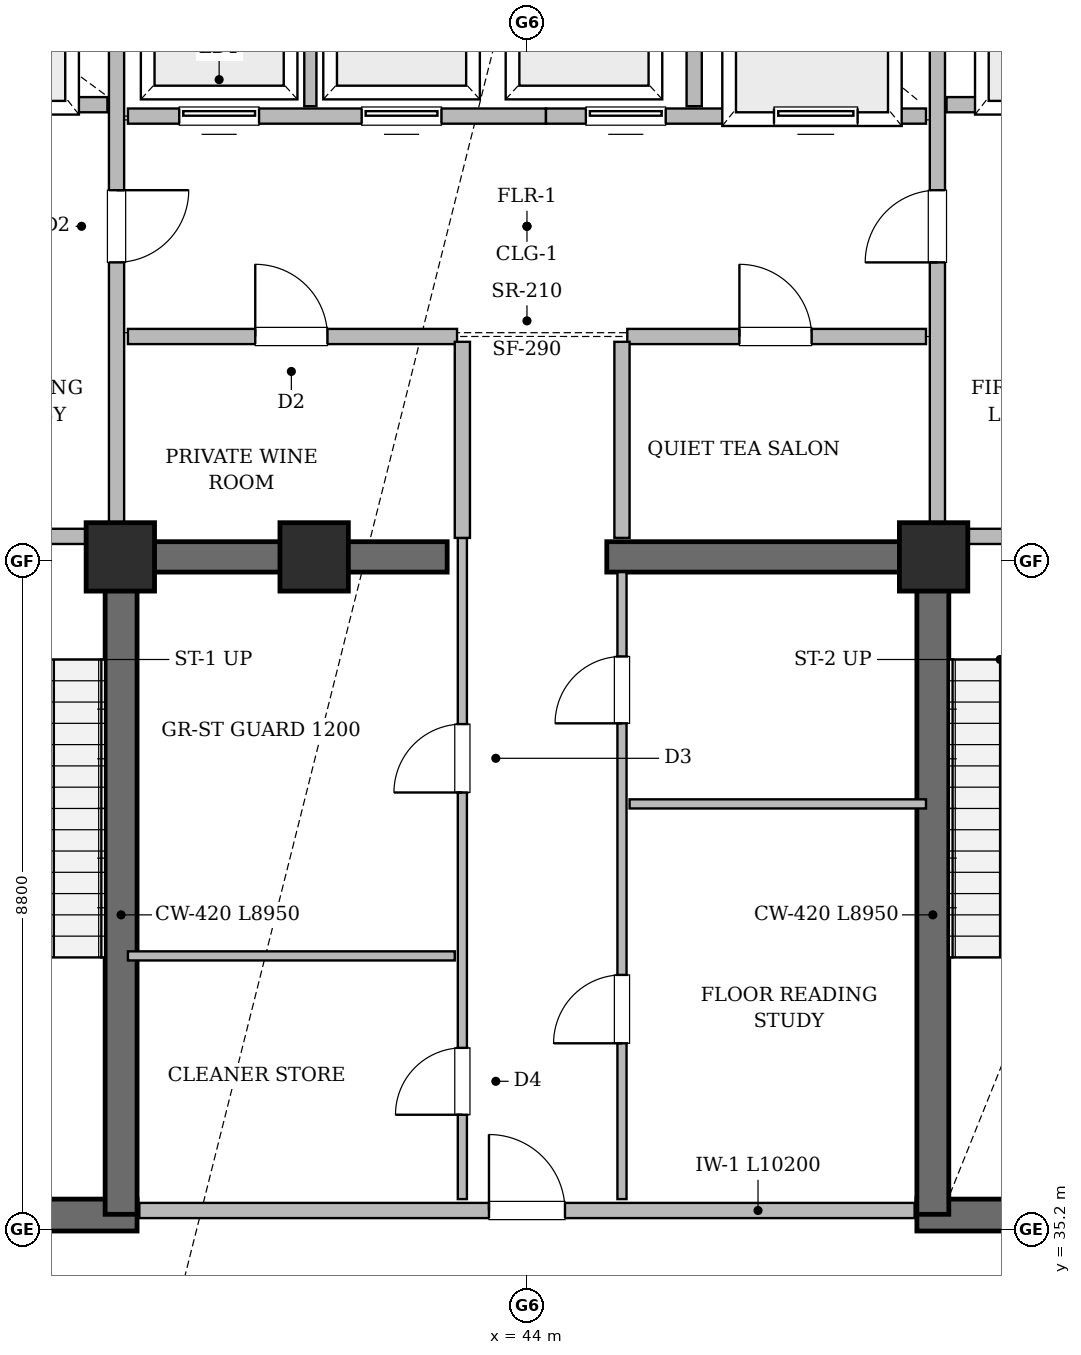
"""IFC4 building model, lengths in metres.
Left out: names, types, materials, properties, quantities, classifications, styles, units other than length and angle.
Written with IfcOpenShell. Run it as: python <this file> out.ifc"""

import sys

from ifc_helpers import new_model, si_unit, direction, frame, frame_2d, origin, origin_2d, place, context, subcontext, project, spatial, rectangle, extrude, element, fill, save


model = new_model("IFC4")
c1 = context("Model", 3, precision=1e-05, world=origin(), true_north=direction((0.0, 1.0)))
c2 = subcontext(c1, "Body", "Model", "MODEL_VIEW")
j1 = project(units=[si_unit("LENGTHUNIT", "METRE"), si_unit("PLANEANGLEUNIT", "RADIAN")], contexts=[c1])
p1 = place(None, origin())
s1 = spatial("IfcSite", under=j1, at=p1, CompositionType="ELEMENT")
p2 = place(p1, origin())
s2 = spatial("IfcBuilding", under=s1, at=p2, CompositionType="ELEMENT")
p3 = place(p2, frame((0.0, 0.0, 295.4)))
s3 = spatial("IfcBuildingStorey", under=s2, at=p3, CompositionType="ELEMENT", Elevation=295.4)
for number, where, z_axis, x_axis in (
    (1, (35.18, 35.39, 0.0), (0.0, 0.0, 1.0), (1.0, 0.0, 0.0)),
    (2, (49.13, 35.39, 0.0), (0.0, 0.0, 1.0), (1.0, 0.0, 0.0)),
):
    element("IfcWall", number, at=place(p3, frame(where, z_axis=z_axis, x_axis=x_axis)), inside=s3, PredefinedType="SHEAR", context=c2, shape_type="SweptSolid", body=[
        extrude(rectangle(XDim=3.69, YDim=0.42, at=frame_2d((1.845, 0.0))), origin(), (0.0, 0.0, 1.0), 5.14),
    ])
for number, where, z_axis, x_axis in (
    (3, (38.66, 35.4, 0.0), (0.0, 0.0, 1.0), (0.0, 1.0, 0.0)),
    (4, (49.34, 35.4, 0.0), (0.0, 0.0, 1.0), (0.0, 1.0, 0.0)),
):
    element("IfcWall", number, at=place(p3, frame(where, z_axis=z_axis, x_axis=x_axis)), inside=s3, PredefinedType="SHEAR", context=c2, shape_type="SweptSolid", body=[
        extrude(rectangle(XDim=8.95, YDim=0.42, at=frame_2d((4.475, 0.0))), origin(), (0.0, 0.0, 1.0), 5.14),
    ])
p4 = place(p3, frame((44.0, 50.1, 0.0), z_axis=(0.0, 0.0, 1.0), x_axis=(0.0, 1.0, 0.0)))
e5 = element("IfcWall", 5, at=p4, inside=s3, PredefinedType="SHEAR", context=c2, shape_type="SweptSolid", body=[
    extrude(rectangle(XDim=2.1, YDim=0.4, at=frame_2d((1.05, 0.0))), origin(), (0.0, 0.0, 1.0), 5.14),
])
for number, where, z_axis, x_axis in (
    (6, (38.75, 44.05, 0.0), (0.0, 0.0, 1.0), (1.0, 0.0, 0.0)),
    (7, (45.05, 44.05, 0.0), (0.0, 0.0, 1.0), (1.0, 0.0, 0.0)),
):
    element("IfcWall", number, at=place(p3, frame(where, z_axis=z_axis, x_axis=x_axis)), inside=s3, PredefinedType="SHEAR", context=c2, shape_type="SweptSolid", body=[
        extrude(rectangle(XDim=4.2, YDim=0.4, at=frame_2d((2.1, 0.0))), origin(), (0.0, 0.0, 1.0), 5.14),
    ])
for number, where, z_axis, x_axis in (
    (8, (38.65, 44.05, 0.0), (0.0, 0.0, 1.0), (1.0, 0.0, 0.0)),
    (9, (49.35, 44.05, 0.0), (0.0, 0.0, 1.0), (1.0, 0.0, 0.0)),
    (10, (41.2, 44.05, 0.0), (0.0, 0.0, 1.0), (1.0, 0.0, 0.0)),
):
    element("IfcColumn", number, at=place(p3, frame(where, z_axis=z_axis, x_axis=x_axis)), inside=s3, PredefinedType="COLUMN", context=c2, shape_type="SweptSolid", body=[
        extrude(rectangle(XDim=0.9, YDim=0.9, at=origin_2d()), origin(), (0.0, 0.0, 1.0), 5.4),
    ])
p5 = place(p3, frame((38.9, 35.45, 0.0), z_axis=(0.0, 0.0, 1.0), x_axis=(1.0, 0.0, 0.0)))
e11 = element("IfcWall", 11, at=p5, inside=s3, PredefinedType="SOLIDWALL", context=c2, shape_type="SweptSolid", body=[
    extrude(rectangle(XDim=10.2, YDim=0.2, at=frame_2d((5.1, 0.0))), origin(), (0.0, 0.0, 1.0), 5.14),
])
p6 = place(p5, frame((4.6, 0.0, 0.0)))
e12 = element("IfcOpeningElement", 12, at=p6, cuts=e11, PredefinedType="OPENING", context=c2, shape_type="SweptSolid", body=[
    extrude(rectangle(XDim=1.0, YDim=2.15, at=frame_2d((0.5, 1.075))), frame((0.0, 0.11, 0.0), z_axis=(0.0, -1.0, 0.0), x_axis=(1.0, 0.0, 0.0)), (0.0, 0.0, 1.0), 0.22),
])
p7 = place(p3, frame((43.15, 35.6, 0.0), z_axis=(0.0, 0.0, 1.0), x_axis=(0.0, 1.0, 0.0)))
e13 = element("IfcWall", 13, at=p7, inside=s3, PredefinedType="PARTITIONING", context=c2, shape_type="SweptSolid", body=[
    extrude(rectangle(XDim=8.7, YDim=0.12, at=frame_2d((4.35, 0.0))), origin(), (0.0, 0.0, 1.0), 5.14),
])
p8 = place(p7, frame((1.11, 0.0, 0.0)))
e14 = element("IfcOpeningElement", 14, at=p8, cuts=e13, PredefinedType="OPENING", context=c2, shape_type="SweptSolid", body=[
    extrude(rectangle(XDim=0.88, YDim=2.1, at=frame_2d((0.44, 1.05))), frame((0.0, 0.07, 0.0), z_axis=(0.0, -1.0, 0.0), x_axis=(1.0, 0.0, 0.0)), (0.0, 0.0, 1.0), 0.14),
])
p9 = place(p7, frame((5.35, 0.0, 0.0)))
e15 = element("IfcOpeningElement", 15, at=p9, cuts=e13, PredefinedType="OPENING", context=c2, shape_type="SweptSolid", body=[
    extrude(rectangle(XDim=0.9, YDim=2.1, at=frame_2d((0.45, 1.05))), frame((0.0, 0.07, 0.0), z_axis=(0.0, -1.0, 0.0), x_axis=(1.0, 0.0, 0.0)), (0.0, 0.0, 1.0), 0.14),
])
p10 = place(p3, frame((45.25, 35.6, 0.0), z_axis=(0.0, 0.0, 1.0), x_axis=(0.0, 1.0, 0.0)))
e16 = element("IfcWall", 16, at=p10, inside=s3, PredefinedType="PARTITIONING", context=c2, shape_type="SweptSolid", body=[
    extrude(rectangle(XDim=8.25, YDim=0.12, at=frame_2d((4.125, 0.0))), origin(), (0.0, 0.0, 1.0), 5.14),
])
p11 = place(p10, frame((2.05, 0.0, 0.0)))
e17 = element("IfcOpeningElement", 17, at=p11, cuts=e16, PredefinedType="OPENING", context=c2, shape_type="SweptSolid", body=[
    extrude(rectangle(XDim=0.9, YDim=2.1, at=frame_2d((0.45, 1.05))), frame((0.0, 0.07, 0.0), z_axis=(0.0, -1.0, 0.0), x_axis=(1.0, 0.0, 0.0)), (0.0, 0.0, 1.0), 0.14),
])
p12 = place(p10, frame((6.26, 0.0, 0.0)))
e18 = element("IfcOpeningElement", 18, at=p12, cuts=e16, PredefinedType="OPENING", context=c2, shape_type="SweptSolid", body=[
    extrude(rectangle(XDim=0.88, YDim=2.1, at=frame_2d((0.44, 1.05))), frame((0.0, 0.07, 0.0), z_axis=(0.0, -1.0, 0.0), x_axis=(1.0, 0.0, 0.0)), (0.0, 0.0, 1.0), 0.14),
])
p13 = place(p3, frame((38.6, 44.5, 0.0), z_axis=(0.0, 0.0, 1.0), x_axis=(0.0, 1.0, 0.0)))
e19 = element("IfcWall", 19, at=p13, inside=s3, PredefinedType="SOLIDWALL", context=c2, shape_type="SweptSolid", body=[
    extrude(rectangle(XDim=7.92, YDim=0.2, at=frame_2d((3.96, 0.0))), origin(), (0.0, 0.0, 1.0), 5.14),
])
p14 = place(p13, frame((3.425, 0.0, 0.0)))
e20 = element("IfcOpeningElement", 20, at=p14, cuts=e19, PredefinedType="OPENING", context=c2, shape_type="SweptSolid", body=[
    extrude(rectangle(XDim=0.95, YDim=2.15, at=frame_2d((0.475, 1.075))), frame((0.0, 0.11, 0.0), z_axis=(0.0, -1.0, 0.0), x_axis=(1.0, 0.0, 0.0)), (0.0, 0.0, 1.0), 0.22),
])
p15 = place(p3, frame((49.4, 44.5, 0.0), z_axis=(0.0, 0.0, 1.0), x_axis=(0.0, 1.0, 0.0)))
e21 = element("IfcWall", 21, at=p15, inside=s3, PredefinedType="SOLIDWALL", context=c2, shape_type="SweptSolid", body=[
    extrude(rectangle(XDim=7.92, YDim=0.2, at=frame_2d((3.96, 0.0))), origin(), (0.0, 0.0, 1.0), 4.228),
])
p16 = place(p15, frame((3.425, 0.0, 0.0)))
e22 = element("IfcOpeningElement", 22, at=p16, cuts=e21, PredefinedType="OPENING", context=c2, shape_type="SweptSolid", body=[
    extrude(rectangle(XDim=0.95, YDim=2.15, at=frame_2d((0.475, 1.075))), frame((0.0, 0.11, 0.0), z_axis=(0.0, -1.0, 0.0), x_axis=(1.0, 0.0, 0.0)), (0.0, 0.0, 1.0), 0.22),
])
p17 = place(p3, frame((38.75, 49.85, 0.0), z_axis=(0.0, 0.0, 1.0), x_axis=(1.0, 0.0, 0.0)))
e23 = element("IfcWall", 23, at=p17, inside=s3, PredefinedType="SOLIDWALL", context=c2, shape_type="SweptSolid", body=[
    extrude(rectangle(XDim=5.5, YDim=0.2, at=frame_2d((2.75, 0.0))), origin(), (0.0, 0.0, 1.0), 5.14),
])
p18 = place(p17, frame((0.675, 0.0, 0.0)))
e24 = element("IfcOpeningElement", 24, at=p18, cuts=e23, PredefinedType="OPENING", context=c2, shape_type="SweptSolid", body=[
    extrude(rectangle(XDim=1.05, YDim=2.15, at=frame_2d((0.525, 1.075))), frame((0.0, 0.11, 0.0), z_axis=(0.0, -1.0, 0.0), x_axis=(1.0, 0.0, 0.0)), (0.0, 0.0, 1.0), 0.22),
])
p19 = place(p17, frame((3.075, 0.0, 0.0)))
e25 = element("IfcOpeningElement", 25, at=p19, cuts=e23, PredefinedType="OPENING", context=c2, shape_type="SweptSolid", body=[
    extrude(rectangle(XDim=1.05, YDim=2.15, at=frame_2d((0.525, 1.075))), frame((0.0, 0.11, 0.0), z_axis=(0.0, -1.0, 0.0), x_axis=(1.0, 0.0, 0.0)), (0.0, 0.0, 1.0), 0.22),
])
p20 = place(p3, frame((44.25, 49.85, 0.0), z_axis=(0.0, 0.0, 1.0), x_axis=(1.0, 0.0, 0.0)))
e26 = element("IfcWall", 26, at=p20, inside=s3, PredefinedType="SOLIDWALL", context=c2, shape_type="SweptSolid", body=[
    extrude(rectangle(XDim=5.0, YDim=0.2, at=frame_2d((2.5, 0.0))), origin(), (0.0, 0.0, 1.0), 4.228),
])
p21 = place(p20, frame((0.525, 0.0, 0.0)))
e27 = element("IfcOpeningElement", 27, at=p21, cuts=e26, PredefinedType="OPENING", context=c2, shape_type="SweptSolid", body=[
    extrude(rectangle(XDim=1.05, YDim=2.15, at=frame_2d((0.525, 1.075))), frame((0.0, 0.11, 0.0), z_axis=(0.0, -1.0, 0.0), x_axis=(1.0, 0.0, 0.0)), (0.0, 0.0, 1.0), 0.22),
])
p22 = place(p20, frame((3.0, 0.0, 0.0)))
e28 = element("IfcOpeningElement", 28, at=p22, cuts=e26, PredefinedType="OPENING", context=c2, shape_type="SweptSolid", body=[
    extrude(rectangle(XDim=1.1, YDim=2.15, at=frame_2d((0.55, 1.075))), frame((0.0, 0.11, 0.0), z_axis=(0.0, -1.0, 0.0), x_axis=(1.0, 0.0, 0.0)), (0.0, 0.0, 1.0), 0.22),
])
p23 = place(p3, frame((38.75, 46.95, 0.0), z_axis=(0.0, 0.0, 1.0), x_axis=(1.0, 0.0, 0.0)))
e29 = element("IfcWall", 29, at=p23, inside=s3, PredefinedType="SOLIDWALL", context=c2, shape_type="SweptSolid", body=[
    extrude(rectangle(XDim=4.33, YDim=0.2, at=frame_2d((2.165, 0.0))), origin(), (0.0, 0.0, 1.0), 5.14),
])
p24 = place(p23, frame((1.675, 0.0, 0.0)))
e30 = element("IfcOpeningElement", 30, at=p24, cuts=e29, PredefinedType="OPENING", context=c2, shape_type="SweptSolid", body=[
    extrude(rectangle(XDim=0.95, YDim=2.1, at=frame_2d((0.475, 1.05))), frame((0.0, 0.11, 0.0), z_axis=(0.0, -1.0, 0.0), x_axis=(1.0, 0.0, 0.0)), (0.0, 0.0, 1.0), 0.22),
])
p25 = place(p3, frame((45.32, 46.95, 0.0), z_axis=(0.0, 0.0, 1.0), x_axis=(1.0, 0.0, 0.0)))
e31 = element("IfcWall", 31, at=p25, inside=s3, PredefinedType="SOLIDWALL", context=c2, shape_type="SweptSolid", body=[
    extrude(rectangle(XDim=3.93, YDim=0.2, at=frame_2d((1.965, 0.0))), origin(), (0.0, 0.0, 1.0), 4.228),
])
p26 = place(p25, frame((1.475, 0.0, 0.0)))
e32 = element("IfcOpeningElement", 32, at=p26, cuts=e31, PredefinedType="OPENING", context=c2, shape_type="SweptSolid", body=[
    extrude(rectangle(XDim=0.95, YDim=2.1, at=frame_2d((0.475, 1.05))), frame((0.0, 0.11, 0.0), z_axis=(0.0, -1.0, 0.0), x_axis=(1.0, 0.0, 0.0)), (0.0, 0.0, 1.0), 0.22),
])
p27 = place(p3, frame((35.65, 44.32, 0.0), z_axis=(0.0, 0.0, 1.0), x_axis=(1.0, 0.0, 0.0)))
e33 = element("IfcWall", 33, at=p27, inside=s3, PredefinedType="SOLIDWALL", context=c2, shape_type="SweptSolid", body=[
    extrude(rectangle(XDim=2.8, YDim=0.2, at=frame_2d((1.4, 0.0))), origin(), (0.0, 0.0, 1.0), 5.14),
])
p28 = place(p27, frame((0.9, 0.0, 0.0)))
e34 = element("IfcOpeningElement", 34, at=p28, cuts=e33, PredefinedType="OPENING", context=c2, shape_type="SweptSolid", body=[
    extrude(rectangle(XDim=1.0, YDim=2.15, at=frame_2d((0.5, 1.075))), frame((0.0, 0.11, 0.0), z_axis=(0.0, -1.0, 0.0), x_axis=(1.0, 0.0, 0.0)), (0.0, 0.0, 1.0), 0.22),
])
p29 = place(p3, frame((49.55, 44.32, 0.0), z_axis=(0.0, 0.0, 1.0), x_axis=(1.0, 0.0, 0.0)))
e35 = element("IfcWall", 35, at=p29, inside=s3, PredefinedType="SOLIDWALL", context=c2, shape_type="SweptSolid", body=[
    extrude(rectangle(XDim=2.8, YDim=0.2, at=frame_2d((1.4, 0.0))), origin(), (0.0, 0.0, 1.0), 4.228),
])
p30 = place(p29, frame((0.9, 0.0, 0.0)))
e36 = element("IfcOpeningElement", 36, at=p30, cuts=e35, PredefinedType="OPENING", context=c2, shape_type="SweptSolid", body=[
    extrude(rectangle(XDim=1.0, YDim=2.15, at=frame_2d((0.5, 1.075))), frame((0.0, 0.11, 0.0), z_axis=(0.0, -1.0, 0.0), x_axis=(1.0, 0.0, 0.0)), (0.0, 0.0, 1.0), 0.22),
])
p31 = place(p3, frame((35.68, 50.0, 0.0), z_axis=(0.0, 0.0, 1.0), x_axis=(1.0, 0.0, 0.0)))
e37 = element("IfcWall", 37, at=p31, inside=s3, PredefinedType="SOLIDWALL", context=c2, shape_type="SweptSolid", body=[
    extrude(rectangle(XDim=2.8, YDim=0.2, at=frame_2d((1.4, 0.0))), origin(), (0.0, 0.0, 1.0), 5.14),
])
p32 = place(p31, frame((0.85, 0.0, 0.0)))
e38 = element("IfcOpeningElement", 38, at=p32, cuts=e37, PredefinedType="OPENING", context=c2, shape_type="SweptSolid", body=[
    extrude(rectangle(XDim=1.1, YDim=2.15, at=frame_2d((0.55, 1.075))), frame((0.0, 0.11, 0.0), z_axis=(0.0, -1.0, 0.0), x_axis=(1.0, 0.0, 0.0)), (0.0, 0.0, 1.0), 0.22),
])
p33 = place(p3, frame((49.52, 50.0, 0.0), z_axis=(0.0, 0.0, 1.0), x_axis=(1.0, 0.0, 0.0)))
e39 = element("IfcWall", 39, at=p33, inside=s3, PredefinedType="SOLIDWALL", context=c2, shape_type="SweptSolid", body=[
    extrude(rectangle(XDim=2.8, YDim=0.2, at=frame_2d((1.4, 0.0))), origin(), (0.0, 0.0, 1.0), 5.14),
])
p34 = place(p33, frame((0.85, 0.0, 0.0)))
e40 = element("IfcOpeningElement", 40, at=p34, cuts=e39, PredefinedType="OPENING", context=c2, shape_type="SweptSolid", body=[
    extrude(rectangle(XDim=1.1, YDim=2.15, at=frame_2d((0.55, 1.075))), frame((0.0, 0.11, 0.0), z_axis=(0.0, -1.0, 0.0), x_axis=(1.0, 0.0, 0.0)), (0.0, 0.0, 1.0), 0.22),
])
p35 = place(p3, frame((38.75, 38.8, 0.0), z_axis=(0.0, 0.0, 1.0), x_axis=(1.0, 0.0, 0.0)))
e41 = element("IfcWall", 41, at=p35, inside=s3, PredefinedType="PARTITIONING", context=c2, shape_type="SweptSolid", body=[
    extrude(rectangle(XDim=4.3, YDim=0.12, at=frame_2d((2.15, 0.0))), origin(), (0.0, 0.0, 1.0), 5.14),
])
p36 = place(p3, frame((45.35, 40.8, 0.0), z_axis=(0.0, 0.0, 1.0), x_axis=(1.0, 0.0, 0.0)))
e42 = element("IfcWall", 42, at=p36, inside=s3, PredefinedType="PARTITIONING", context=c2, shape_type="SweptSolid", body=[
    extrude(rectangle(XDim=3.9, YDim=0.12, at=frame_2d((1.95, 0.0))), origin(), (0.0, 0.0, 1.0), 5.14),
])
for number, where, z_axis, x_axis in (
    (43, (43.15, 44.3, 0.0), (0.0, 0.0, 1.0), (0.0, 1.0, 0.0)),
    (44, (45.25, 44.3, 0.0), (0.0, 0.0, 1.0), (0.0, 1.0, 0.0)),
):
    element("IfcWall", number, at=place(p3, frame(where, z_axis=z_axis, x_axis=x_axis)), inside=s3, PredefinedType="SOLIDWALL", context=c2, shape_type="SweptSolid", body=[
        extrude(rectangle(XDim=2.58, YDim=0.2, at=frame_2d((1.29, 0.0))), origin(), (0.0, 0.0, 1.0), 5.14),
    ])
p37 = place(p3, frame((41.15, 49.98, 0.0), z_axis=(0.0, 0.0, 1.0), x_axis=(0.0, 1.0, 0.0)))
e45 = element("IfcWall", 45, at=p37, inside=s3, PredefinedType="SOLIDWALL", context=c2, shape_type="SweptSolid", body=[
    extrude(rectangle(XDim=2.37, YDim=0.16, at=frame_2d((1.185, 0.0))), origin(), (0.0, 0.0, 1.0), 5.14),
])
p38 = place(p3, frame((46.2, 49.98, 0.0), z_axis=(0.0, 0.0, 1.0), x_axis=(0.0, 1.0, 0.0)))
e46 = element("IfcWall", 46, at=p38, inside=s3, PredefinedType="SOLIDWALL", context=c2, shape_type="SweptSolid", body=[
    extrude(rectangle(XDim=2.37, YDim=0.2, at=frame_2d((1.185, 0.0))), origin(), (0.0, 0.0, 1.0), 5.14),
])
p39 = place(p14, frame((0.95, 0.0, 0.0), z_axis=(0.0, 0.0, 1.0), x_axis=(-1.0, 0.0, 0.0)))
e47 = element("IfcDoor", 47, at=p39, inside=s3, OperationType="SINGLE_SWING_RIGHT", PredefinedType="DOOR", context=c2, shape_type="SweptSolid", body=[
    extrude(rectangle(XDim=0.95, YDim=2.15, at=frame_2d((0.475, 1.075))), frame((0.0, 0.025, 0.0), z_axis=(0.0, -1.0, 0.0), x_axis=(1.0, 0.0, 0.0)), (0.0, 0.0, 1.0), 0.05),
])
fill(e20, e47)
p40 = place(p16, origin())
e48 = element("IfcDoor", 48, at=p40, inside=s3, OperationType="SINGLE_SWING_LEFT", PredefinedType="DOOR", context=c2, shape_type="SweptSolid", body=[
    extrude(rectangle(XDim=0.95, YDim=2.15, at=frame_2d((0.475, 1.075))), frame((0.0, 0.025, 0.0), z_axis=(0.0, -1.0, 0.0), x_axis=(1.0, 0.0, 0.0)), (0.0, 0.0, 1.0), 0.05),
])
fill(e22, e48)
p41 = place(p6, origin())
e49 = element("IfcDoor", 49, at=p41, inside=s3, OperationType="SINGLE_SWING_LEFT", PredefinedType="DOOR", context=c2, shape_type="SweptSolid", body=[
    extrude(rectangle(XDim=1.0, YDim=2.15, at=frame_2d((0.5, 1.075))), frame((0.0, 0.025, 0.0), z_axis=(0.0, -1.0, 0.0), x_axis=(1.0, 0.0, 0.0)), (0.0, 0.0, 1.0), 0.05),
])
fill(e12, e49)
p42 = place(p18, origin())
e50 = element("IfcDoor", 50, at=p42, inside=s3, OperationType="SLIDING_TO_LEFT", PredefinedType="DOOR", context=c2, shape_type="SweptSolid", body=[
    extrude(rectangle(XDim=1.05, YDim=2.15, at=frame_2d((0.525, 1.075))), frame((0.0, 0.025, 0.0), z_axis=(0.0, -1.0, 0.0), x_axis=(1.0, 0.0, 0.0)), (0.0, 0.0, 1.0), 0.05),
])
fill(e24, e50)
p43 = place(p19, origin())
e51 = element("IfcDoor", 51, at=p43, inside=s3, OperationType="SLIDING_TO_LEFT", PredefinedType="DOOR", context=c2, shape_type="SweptSolid", body=[
    extrude(rectangle(XDim=1.05, YDim=2.15, at=frame_2d((0.525, 1.075))), frame((0.0, 0.025, 0.0), z_axis=(0.0, -1.0, 0.0), x_axis=(1.0, 0.0, 0.0)), (0.0, 0.0, 1.0), 0.05),
])
fill(e25, e51)
p44 = place(p21, origin())
e52 = element("IfcDoor", 52, at=p44, inside=s3, OperationType="SLIDING_TO_LEFT", PredefinedType="DOOR", context=c2, shape_type="SweptSolid", body=[
    extrude(rectangle(XDim=1.05, YDim=2.15, at=frame_2d((0.525, 1.075))), frame((0.0, 0.025, 0.0), z_axis=(0.0, -1.0, 0.0), x_axis=(1.0, 0.0, 0.0)), (0.0, 0.0, 1.0), 0.05),
])
fill(e27, e52)
p45 = place(p22, origin())
e53 = element("IfcDoor", 53, at=p45, inside=s3, OperationType="SLIDING_TO_LEFT", PredefinedType="DOOR", context=c2, shape_type="SweptSolid", body=[
    extrude(rectangle(XDim=1.1, YDim=2.15, at=frame_2d((0.55, 1.075))), frame((0.0, 0.025, 0.0), z_axis=(0.0, -1.0, 0.0), x_axis=(1.0, 0.0, 0.0)), (0.0, 0.0, 1.0), 0.05),
])
fill(e28, e53)
p46 = place(p24, origin())
e54 = element("IfcDoor", 54, at=p46, inside=s3, OperationType="SINGLE_SWING_LEFT", PredefinedType="DOOR", context=c2, shape_type="SweptSolid", body=[
    extrude(rectangle(XDim=0.95, YDim=2.1, at=frame_2d((0.475, 1.05))), frame((0.0, 0.025, 0.0), z_axis=(0.0, -1.0, 0.0), x_axis=(1.0, 0.0, 0.0)), (0.0, 0.0, 1.0), 0.05),
])
fill(e30, e54)
p47 = place(p26, origin())
e55 = element("IfcDoor", 55, at=p47, inside=s3, OperationType="SINGLE_SWING_LEFT", PredefinedType="DOOR", context=c2, shape_type="SweptSolid", body=[
    extrude(rectangle(XDim=0.95, YDim=2.1, at=frame_2d((0.475, 1.05))), frame((0.0, 0.025, 0.0), z_axis=(0.0, -1.0, 0.0), x_axis=(1.0, 0.0, 0.0)), (0.0, 0.0, 1.0), 0.05),
])
fill(e32, e55)
p48 = place(p8, origin())
e56 = element("IfcDoor", 56, at=p48, inside=s3, OperationType="SINGLE_SWING_LEFT", PredefinedType="DOOR", context=c2, shape_type="SweptSolid", body=[
    extrude(rectangle(XDim=0.88, YDim=2.1, at=frame_2d((0.44, 1.05))), frame((0.0, 0.025, 0.0), z_axis=(0.0, -1.0, 0.0), x_axis=(1.0, 0.0, 0.0)), (0.0, 0.0, 1.0), 0.05),
])
fill(e14, e56)
p49 = place(p9, origin())
e57 = element("IfcDoor", 57, at=p49, inside=s3, OperationType="SINGLE_SWING_LEFT", PredefinedType="DOOR", context=c2, shape_type="SweptSolid", body=[
    extrude(rectangle(XDim=0.9, YDim=2.1, at=frame_2d((0.45, 1.05))), frame((0.0, 0.025, 0.0), z_axis=(0.0, -1.0, 0.0), x_axis=(1.0, 0.0, 0.0)), (0.0, 0.0, 1.0), 0.05),
])
fill(e15, e57)
p50 = place(p11, origin())
e58 = element("IfcDoor", 58, at=p50, inside=s3, OperationType="SINGLE_SWING_LEFT", PredefinedType="DOOR", context=c2, shape_type="SweptSolid", body=[
    extrude(rectangle(XDim=0.9, YDim=2.1, at=frame_2d((0.45, 1.05))), frame((0.0, 0.025, 0.0), z_axis=(0.0, -1.0, 0.0), x_axis=(1.0, 0.0, 0.0)), (0.0, 0.0, 1.0), 0.05),
])
fill(e17, e58)
p51 = place(p12, origin())
e59 = element("IfcDoor", 59, at=p51, inside=s3, OperationType="SINGLE_SWING_LEFT", PredefinedType="DOOR", context=c2, shape_type="SweptSolid", body=[
    extrude(rectangle(XDim=0.88, YDim=2.1, at=frame_2d((0.44, 1.05))), frame((0.0, 0.025, 0.0), z_axis=(0.0, -1.0, 0.0), x_axis=(1.0, 0.0, 0.0)), (0.0, 0.0, 1.0), 0.05),
])
fill(e18, e59)
save(model, sys.argv[1])
